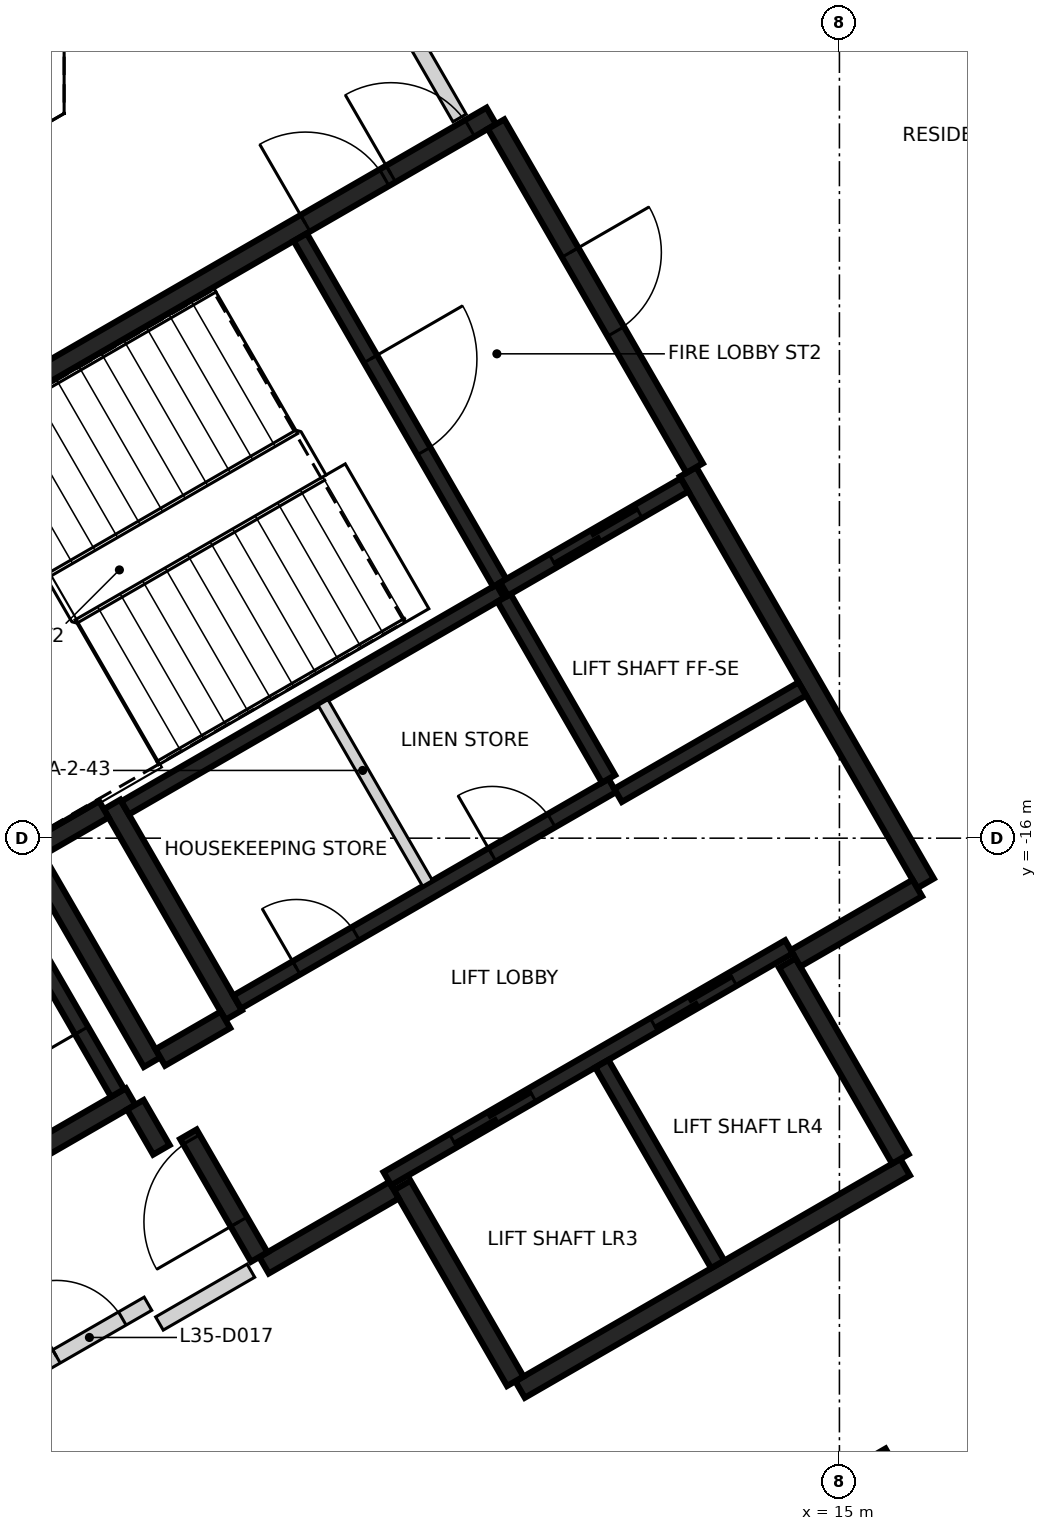
"""IFC4 building model, lengths in metres.
Left out: names, types, materials, properties, quantities, classifications, styles, units other than length and angle.
Written with IfcOpenShell. Run it as: python <this file> out.ifc"""

import sys

from ifc_helpers import new_model, si_unit, direction, frame, frame_2d, origin, origin_2d, place, context, subcontext, project, spatial, rectangle, extrude, element, fill, save


model = new_model("IFC4")
c1 = context("Model", 3, precision=1e-05, world=origin(), true_north=direction((0.0, 1.0)))
c2 = subcontext(c1, "Body", "Model", "MODEL_VIEW")
j1 = project(units=[si_unit("LENGTHUNIT", "METRE"), si_unit("PLANEANGLEUNIT", "RADIAN")], contexts=[c1])
p1 = place(None, origin())
s1 = spatial("IfcSite", under=j1, at=p1, CompositionType="ELEMENT")
p2 = place(p1, origin())
s2 = spatial("IfcBuilding", under=s1, at=p2, CompositionType="ELEMENT")
p3 = place(p2, frame((0.0, 0.0, 143.2)))
s3 = spatial("IfcBuildingStorey", under=s2, at=p3, CompositionType="ELEMENT", Elevation=143.2)
p4 = place(p3, frame((15.207, -26.34, -0.4), z_axis=(0.0, 0.0, 1.0), x_axis=(-0.5, 0.866025403784, 0.0)))
e1 = element("IfcColumn", 1, at=p4, inside=s3, PredefinedType="COLUMN", context=c2, shape_type="SweptSolid", body=[
    extrude(rectangle(XDim=3.6, YDim=3.0, at=origin_2d()), origin(), (0.0, 0.0, 1.0), 3.6),
])
p5 = place(p3, frame((0.417, -12.273, 0.0), z_axis=(0.0, 0.0, 1.0), x_axis=(0.866021906294, 0.500006057782, 0.0)))
e2 = element("IfcWall", 2, at=p5, inside=s3, PredefinedType="SHEAR", context=c2, shape_type="SweptSolid", body=[
    extrude(rectangle(XDim=11.55, YDim=0.25, at=frame_2d((5.775, 0.0))), origin(), (0.0, 0.0, 1.0), 3.2),
])
p6 = place(p5, frame((10.025, 0.0, 0.0)))
e3 = element("IfcOpeningElement", 3, at=p6, cuts=e2, PredefinedType="OPENING", context=c2, shape_type="SweptSolid", body=[
    extrude(rectangle(XDim=1.2, YDim=2.1, at=frame_2d((0.6, 1.05))), frame((0.0, 0.135, 0.0), z_axis=(0.0, -1.0, 0.0), x_axis=(1.0, 0.0, 0.0)), (0.0, 0.0, 1.0), 0.27),
])
p7 = place(p5, frame((8.725, 0.0, 0.0)))
e4 = element("IfcOpeningElement", 4, at=p7, cuts=e2, PredefinedType="OPENING", context=c2, shape_type="SweptSolid", body=[
    extrude(rectangle(XDim=1.2, YDim=2.1, at=frame_2d((0.6, 1.05))), frame((0.0, 0.135, 0.0), z_axis=(0.0, -1.0, 0.0), x_axis=(1.0, 0.0, 0.0)), (0.0, 0.0, 1.0), 0.27),
])
p8 = place(p3, frame((13.008, -11.181, 0.0), z_axis=(0.0, 0.0, 1.0), x_axis=(0.500004234368, -0.866022959057, 0.0)))
e5 = element("IfcWall", 5, at=p8, inside=s3, PredefinedType="SHEAR", context=c2, shape_type="SweptSolid", body=[
    extrude(rectangle(XDim=6.25, YDim=0.25, at=frame_2d((3.125, 0.0))), origin(), (0.0, 0.0, 1.0), 3.2),
])
p9 = place(p3, frame((15.865, -20.328, 0.0), z_axis=(0.0, 0.0, 1.0), x_axis=(-0.86602852612, -0.499994591916, 0.0)))
e6 = element("IfcWall", 6, at=p9, inside=s3, PredefinedType="SHEAR", context=c2, shape_type="SweptSolid", body=[
    extrude(rectangle(XDim=5.85, YDim=0.25, at=frame_2d((2.925, 0.0))), origin(), (0.0, 0.0, 1.0), 3.2),
])
p10 = place(p3, frame((10.483, -6.606, 0.0), z_axis=(0.0, 0.0, 1.0), x_axis=(0.49999885962, -0.866026062182, 0.0)))
e7 = element("IfcWall", 7, at=p10, inside=s3, PredefinedType="SHEAR", context=c2, shape_type="SweptSolid", body=[
    extrude(rectangle(XDim=5.225, YDim=0.25, at=frame_2d((2.612, 0.0))), origin(), (0.0, 0.0, 1.0), 3.2),
])
p11 = place(p10, frame((1.95, 0.0, 0.0)))
e8 = element("IfcOpeningElement", 8, at=p11, cuts=e7, PredefinedType="OPENING", context=c2, shape_type="SweptSolid", body=[
    extrude(rectangle(XDim=1.2, YDim=2.1, at=frame_2d((0.6, 1.05))), frame((0.0, 0.135, 0.0), z_axis=(0.0, -1.0, 0.0), x_axis=(1.0, 0.0, 0.0)), (0.0, 0.0, 1.0), 0.27),
])
p12 = place(p3, frame((7.031, -18.327, 0.0), z_axis=(0.0, 0.0, 1.0), x_axis=(-0.499971222258, 0.866042017984, 0.0)))
e9 = element("IfcWall", 9, at=p12, inside=s3, PredefinedType="SHEAR", context=c2, shape_type="SweptSolid", body=[
    extrude(rectangle(XDim=3.2, YDim=0.25, at=frame_2d((1.6, 0.0))), origin(), (0.0, 0.0, 1.0), 3.2),
])
for number, where, z_axis, x_axis in (
    (10, (14.315, -17.644, 0.0), (0.0, 0.0, 1.0), (0.5, -0.866, 0.0)),
    (11, (10.736, -23.145, 0.0), (0.0, 0.0, 1.0), (-0.5, 0.866, 0.0)),
):
    element("IfcWall", number, at=place(p3, frame(where, z_axis=z_axis, x_axis=x_axis)), inside=s3, PredefinedType="SHEAR", context=c2, shape_type="SweptSolid", body=[
        extrude(rectangle(XDim=2.974, YDim=0.25, at=frame_2d((1.487, 0.0))), origin(), (0.0, 0.0, 1.0), 3.2),
    ])
p13 = place(p3, frame((5.675, -19.399, 0.0), z_axis=(0.0, 0.0, 1.0), x_axis=(-0.866026637627, -0.499997862916, 0.0)))
e12 = element("IfcWall", 12, at=p13, inside=s3, PredefinedType="SHEAR", context=c2, shape_type="SweptSolid", body=[
    extrude(rectangle(XDim=2.865, YDim=0.25, at=frame_2d((1.432, 0.0))), origin(), (0.0, 0.0, 1.0), 3.2),
])
p14 = place(p3, frame((4.414, -16.276, 0.0), z_axis=(0.0, 0.0, 1.0), x_axis=(0.500003324108, -0.866023484601, 0.0)))
e13 = element("IfcWall", 13, at=p14, inside=s3, PredefinedType="SHEAR", context=c2, shape_type="SweptSolid", body=[
    extrude(rectangle(XDim=3.085, YDim=0.25, at=frame_2d((1.542, 0.0))), origin(), (0.0, 0.0, 1.0), 3.2),
])
p15 = place(p3, frame((5.322, -15.619, 0.0), z_axis=(0.0, 0.0, 1.0), x_axis=(-0.866026229868, -0.499998569178, 0.0)))
e14 = element("IfcWall", 14, at=p15, inside=s3, PredefinedType="SHEAR", context=c2, shape_type="SweptSolid", body=[
    extrude(rectangle(XDim=2.449, YDim=0.25, at=frame_2d((1.225, 0.0))), origin(), (0.0, 0.0, 1.0), 3.2),
])
p16 = place(p3, frame((9.14, -20.631, 0.0), z_axis=(0.0, 0.0, 1.0), x_axis=(-0.866043531843, -0.499968599967, 0.0)))
e15 = element("IfcWall", 15, at=p16, inside=s3, PredefinedType="SHEAR", context=c2, shape_type="SweptSolid", body=[
    extrude(rectangle(XDim=1.975, YDim=0.25, at=frame_2d((0.987, 0.0))), origin(), (0.0, 0.0, 1.0), 3.2),
])
p17 = place(p3, frame((16.025, -16.656, 0.0), z_axis=(0.0, 0.0, 1.0), x_axis=(-0.866016279763, -0.500015802937, 0.0)))
e16 = element("IfcWall", 16, at=p17, inside=s3, PredefinedType="SHEAR", context=c2, shape_type="SweptSolid", body=[
    extrude(rectangle(XDim=1.849, YDim=0.25, at=frame_2d((0.925, 0.0))), origin(), (0.0, 0.0, 1.0), 3.2),
])
p18 = place(p3, frame((7.367, -21.51, 0.0), z_axis=(0.0, 0.0, 1.0), x_axis=(-0.499983108224, 0.866035156036, 0.0)))
e17 = element("IfcWall", 17, at=p18, inside=s3, PredefinedType="SHEAR", context=c2, shape_type="SweptSolid", body=[
    extrude(rectangle(XDim=1.865, YDim=0.25, at=frame_2d((0.932, 0.0))), origin(), (0.0, 0.0, 1.0), 3.2),
])
p19 = place(p18, frame((0.535, 0.0, 0.0)))
e18 = element("IfcOpeningElement", 18, at=p19, cuts=e17, PredefinedType="OPENING", context=c2, shape_type="SweptSolid", body=[
    extrude(rectangle(XDim=1.25, YDim=2.1, at=frame_2d((0.625, 1.05))), frame((0.0, 0.135, 0.0), z_axis=(0.0, -1.0, 0.0), x_axis=(1.0, 0.0, 0.0)), (0.0, 0.0, 1.0), 0.27),
])
p20 = place(p3, frame((6.065, -18.885, 0.0), z_axis=(0.0, 0.0, 1.0), x_axis=(0.866017078145, 0.500014420154, 0.0)))
e19 = element("IfcWall", 19, at=p20, inside=s3, PredefinedType="SHEAR", context=c2, shape_type="SweptSolid", body=[
    extrude(rectangle(XDim=0.989, YDim=0.25, at=frame_2d((0.495, 0.0))), origin(), (0.0, 0.0, 1.0), 3.2),
])
p21 = place(p3, frame((6.08, -20.1, 0.0), z_axis=(0.0, 0.0, 1.0), x_axis=(-0.500051773299, 0.865995510393, 0.0)))
e20 = element("IfcWall", 20, at=p21, inside=s3, PredefinedType="SHEAR", context=c2, shape_type="SweptSolid", body=[
    extrude(rectangle(XDim=0.685, YDim=0.25, at=frame_2d((0.342, 0.0))), origin(), (0.0, 0.0, 1.0), 3.2),
])
p22 = place(p3, frame((9.052, -20.48, 0.0), z_axis=(0.0, 0.0, 1.0), x_axis=(0.866030299012, 0.499991521122, 0.0)))
e21 = element("IfcWall", 21, at=p22, inside=s3, PredefinedType="SHEAR", context=c2, shape_type="SweptSolid", body=[
    extrude(rectangle(XDim=6.1, YDim=0.2, at=frame_2d((3.05, 0.0))), origin(), (0.0, 0.0, 1.0), 3.2),
])
p23 = place(p22, frame((1.0, 0.0, 0.0)))
e22 = element("IfcOpeningElement", 22, at=p23, cuts=e21, PredefinedType="OPENING", context=c2, shape_type="SweptSolid", body=[
    extrude(rectangle(XDim=1.2, YDim=2.1, at=frame_2d((0.6, 1.05))), frame((0.0, 0.11, 0.0), z_axis=(0.0, -1.0, 0.0), x_axis=(1.0, 0.0, 0.0)), (0.0, 0.0, 1.0), 0.22),
])
p24 = place(p22, frame((4.05, 0.0, 0.0)))
e23 = element("IfcOpeningElement", 23, at=p24, cuts=e21, PredefinedType="OPENING", context=c2, shape_type="SweptSolid", body=[
    extrude(rectangle(XDim=1.2, YDim=2.1, at=frame_2d((0.6, 1.05))), frame((0.0, 0.11, 0.0), z_axis=(0.0, -1.0, 0.0), x_axis=(1.0, 0.0, 0.0)), (0.0, 0.0, 1.0), 0.22),
])
p25 = place(p3, frame((10.538, -12.752, 0.0), z_axis=(0.0, 0.0, 1.0), x_axis=(-0.866038630372, -0.499977090179, 0.0)))
e24 = element("IfcWall", 24, at=p25, inside=s3, PredefinedType="SHEAR", context=c2, shape_type="SweptSolid", body=[
    extrude(rectangle(XDim=5.699, YDim=0.2, at=frame_2d((2.85, 0.0))), origin(), (0.0, 0.0, 1.0), 3.2),
])
p26 = place(p3, frame((7.077, -18.156, 0.0), z_axis=(0.0, 0.0, 1.0), x_axis=(0.866038630372, 0.499977090179, 0.0)))
e25 = element("IfcWall", 25, at=p26, inside=s3, PredefinedType="SHEAR", context=c2, shape_type="SweptSolid", body=[
    extrude(rectangle(XDim=5.699, YDim=0.2, at=frame_2d((2.85, 0.0))), origin(), (0.0, 0.0, 1.0), 3.2),
])
p27 = place(p26, frame((0.899, 0.0, 0.0)))
e26 = element("IfcOpeningElement", 26, at=p27, cuts=e25, PredefinedType="OPENING", context=c2, shape_type="SweptSolid", body=[
    extrude(rectangle(XDim=0.9, YDim=2.1, at=frame_2d((0.45, 1.05))), frame((0.0, 0.11, 0.0), z_axis=(0.0, -1.0, 0.0), x_axis=(1.0, 0.0, 0.0)), (0.0, 0.0, 1.0), 0.22),
])
p28 = place(p26, frame((3.874, 0.0, 0.0)))
e27 = element("IfcOpeningElement", 27, at=p28, cuts=e25, PredefinedType="OPENING", context=c2, shape_type="SweptSolid", body=[
    extrude(rectangle(XDim=0.9, YDim=2.1, at=frame_2d((0.45, 1.05))), frame((0.0, 0.11, 0.0), z_axis=(0.0, -1.0, 0.0), x_axis=(1.0, 0.0, 0.0)), (0.0, 0.0, 1.0), 0.22),
])
p29 = place(p3, frame((7.906, -8.094, 0.0), z_axis=(0.0, 0.0, 1.0), x_axis=(0.500024287448, -0.866011380966, 0.0)))
e28 = element("IfcWall", 28, at=p29, inside=s3, PredefinedType="SHEAR", context=c2, shape_type="SweptSolid", body=[
    extrude(rectangle(XDim=5.251, YDim=0.2, at=frame_2d((2.625, 0.0))), origin(), (0.0, 0.0, 1.0), 3.2),
])
p30 = place(p29, frame((1.849, 0.0, 0.0)))
e29 = element("IfcOpeningElement", 29, at=p30, cuts=e28, PredefinedType="OPENING", context=c2, shape_type="SweptSolid", body=[
    extrude(rectangle(XDim=1.4, YDim=2.1, at=frame_2d((0.7, 1.05))), frame((0.0, 0.11, 0.0), z_axis=(0.0, -1.0, 0.0), x_axis=(1.0, 0.0, 0.0)), (0.0, 0.0, 1.0), 0.22),
])
p31 = place(p3, frame((11.875, -18.967, 0.0), z_axis=(0.0, 0.0, 1.0), x_axis=(0.49998131003, -0.866036194175, 0.0)))
e30 = element("IfcWall", 30, at=p31, inside=s3, PredefinedType="SHEAR", context=c2, shape_type="SweptSolid", body=[
    extrude(rectangle(XDim=3.048, YDim=0.2, at=frame_2d((1.524, 0.0))), origin(), (0.0, 0.0, 1.0), 3.2),
])
p32 = place(p3, frame((5.503, -19.352, 0.0), z_axis=(0.0, 0.0, 1.0), x_axis=(-0.499986818241, 0.866033014143, 0.0)))
e31 = element("IfcWall", 31, at=p32, inside=s3, PredefinedType="SHEAR", context=c2, shape_type="SweptSolid", body=[
    extrude(rectangle(XDim=2.798, YDim=0.2, at=frame_2d((1.399, 0.0))), origin(), (0.0, 0.0, 1.0), 3.2),
])
p33 = place(p32, frame((0.949, 0.0, 0.0)))
e32 = element("IfcOpeningElement", 32, at=p33, cuts=e31, PredefinedType="OPENING", context=c2, shape_type="SweptSolid", body=[
    extrude(rectangle(XDim=0.9, YDim=2.1, at=frame_2d((0.45, 1.05))), frame((0.0, 0.11, 0.0), z_axis=(0.0, -1.0, 0.0), x_axis=(1.0, 0.0, 0.0)), (0.0, 0.0, 1.0), 0.22),
])
p34 = place(p3, frame((11.963, -15.22, 0.0), z_axis=(0.0, 0.0, 1.0), x_axis=(-0.500034990121, 0.866005201286, 0.0)))
e33 = element("IfcWall", 33, at=p34, inside=s3, PredefinedType="SHEAR", context=c2, shape_type="SweptSolid", body=[
    extrude(rectangle(XDim=2.75, YDim=0.2, at=frame_2d((1.375, 0.0))), origin(), (0.0, 0.0, 1.0), 3.2),
])
p35 = place(p3, frame((10.587, -12.723, 0.0), z_axis=(0.0, 0.0, 1.0), x_axis=(0.866037306777, 0.499979382845, 0.0)))
e34 = element("IfcWall", 34, at=p35, inside=s3, PredefinedType="SHEAR", context=c2, shape_type="SweptSolid", body=[
    extrude(rectangle(XDim=2.742, YDim=0.2, at=frame_2d((1.371, 0.0))), origin(), (0.0, 0.0, 1.0), 3.2),
])
p36 = place(p35, frame((0.743, 0.0, 0.0)))
e35 = element("IfcOpeningElement", 35, at=p36, cuts=e34, PredefinedType="OPENING", context=c2, shape_type="SweptSolid", body=[
    extrude(rectangle(XDim=1.3, YDim=2.1, at=frame_2d((0.65, 1.05))), frame((0.0, 0.11, 0.0), z_axis=(0.0, -1.0, 0.0), x_axis=(1.0, 0.0, 0.0)), (0.0, 0.0, 1.0), 0.22),
])
p37 = place(p3, frame((14.512, -14.037, 0.0), z_axis=(0.0, 0.0, 1.0), x_axis=(-0.866044696403, -0.499966582715, 0.0)))
e36 = element("IfcWall", 36, at=p37, inside=s3, PredefinedType="SHEAR", context=c2, shape_type="SweptSolid", body=[
    extrude(rectangle(XDim=2.799, YDim=0.2, at=frame_2d((1.399, 0.0))), origin(), (0.0, 0.0, 1.0), 3.2),
])
p38 = place(p3, frame((8.207, -14.214, 0.0), z_axis=(0.0, 0.0, 1.0), x_axis=(0.50002746344, -0.86600954718, 0.0)))
e37 = element("IfcWall", 37, at=p38, inside=s3, PredefinedType="PARTITIONING", context=c2, shape_type="SweptSolid", body=[
    extrude(rectangle(XDim=2.748, YDim=0.15, at=frame_2d((1.374, 0.0))), origin(), (0.0, 0.0, 1.0), 3.2),
])
p39 = place(p3, frame((4.362, -23.012, 0.0), z_axis=(0.0, 0.0, 1.0), x_axis=(0.866692617793, 0.49884256661, 0.0)))
e38 = element("IfcWall", 38, at=p39, inside=s3, PredefinedType="PARTITIONING", context=c2, shape_type="SweptSolid", body=[
    extrude(rectangle(XDim=1.778, YDim=0.2, at=frame_2d((0.889, 0.0))), origin(), (0.0, 0.0, 1.0), 3.2),
])
p40 = place(p39, frame((0.389, 0.0, 0.0)))
e39 = element("IfcOpeningElement", 39, at=p40, cuts=e38, PredefinedType="OPENING", context=c2, shape_type="SweptSolid", body=[
    extrude(rectangle(XDim=1.0, YDim=2.1, at=frame_2d((0.5, 1.05))), frame((0.0, 0.11, 0.0), z_axis=(0.0, -1.0, 0.0), x_axis=(1.0, 0.0, 0.0)), (0.0, 0.0, 1.0), 0.22),
])
p41 = place(p3, frame((6.054, -22.385, 0.0), z_axis=(0.0, 0.0, 1.0), x_axis=(0.86593101922, 0.500163443238, 0.0)))
e40 = element("IfcWall", 40, at=p41, inside=s3, PredefinedType="PARTITIONING", context=c2, shape_type="SweptSolid", body=[
    extrude(rectangle(XDim=1.39, YDim=0.2, at=frame_2d((0.695, 0.0))), origin(), (0.0, 0.0, 1.0), 3.2),
])
p42 = place(p3, frame((9.4, -5.482, 0.0), z_axis=(0.0, 0.0, 1.0), x_axis=(0.499909562097, -0.866077611837, 0.0)))
e41 = element("IfcWall", 41, at=p42, inside=s3, PredefinedType="PARTITIONING", context=c2, shape_type="SweptSolid", body=[
    extrude(rectangle(XDim=1.205, YDim=0.2, at=frame_2d((0.603, 0.0))), origin(), (0.0, 0.0, 1.0), 3.2),
])
p43 = place(p36, origin())
e42 = element("IfcDoor", 42, at=p43, inside=s3, OperationType="SLIDING_TO_RIGHT", PredefinedType="DOOR", context=c2, shape_type="SweptSolid", body=[
    extrude(rectangle(XDim=1.3, YDim=2.1, at=frame_2d((0.65, 1.05))), frame((0.0, 0.025, 0.0), z_axis=(0.0, -1.0, 0.0), x_axis=(1.0, 0.0, 0.0)), (0.0, 0.0, 1.0), 0.05),
])
fill(e35, e42)
p44 = place(p23, origin())
e43 = element("IfcDoor", 43, at=p44, inside=s3, OperationType="DOUBLE_DOOR_SLIDING", PredefinedType="DOOR", context=c2, shape_type="SweptSolid", body=[
    extrude(rectangle(XDim=1.2, YDim=2.1, at=frame_2d((0.6, 1.05))), frame((0.0, 0.025, 0.0), z_axis=(0.0, -1.0, 0.0), x_axis=(1.0, 0.0, 0.0)), (0.0, 0.0, 1.0), 0.05),
])
fill(e22, e43)
p45 = place(p24, origin())
e44 = element("IfcDoor", 44, at=p45, inside=s3, OperationType="DOUBLE_DOOR_SLIDING", PredefinedType="DOOR", context=c2, shape_type="SweptSolid", body=[
    extrude(rectangle(XDim=1.2, YDim=2.1, at=frame_2d((0.6, 1.05))), frame((0.0, 0.025, 0.0), z_axis=(0.0, -1.0, 0.0), x_axis=(1.0, 0.0, 0.0)), (0.0, 0.0, 1.0), 0.05),
])
fill(e23, e44)
p46 = place(p19, origin())
e45 = element("IfcDoor", 45, at=p46, inside=s3, OperationType="SINGLE_SWING_LEFT", PredefinedType="DOOR", context=c2, shape_type="SweptSolid", body=[
    extrude(rectangle(XDim=1.25, YDim=2.1, at=frame_2d((0.625, 1.05))), frame((0.0, 0.025, 0.0), z_axis=(0.0, -1.0, 0.0), x_axis=(1.0, 0.0, 0.0)), (0.0, 0.0, 1.0), 0.05),
])
fill(e18, e45)
p47 = place(p6, origin())
e46 = element("IfcDoor", 46, at=p47, inside=s3, OperationType="SINGLE_SWING_LEFT", PredefinedType="DOOR", context=c2, shape_type="SweptSolid", body=[
    extrude(rectangle(XDim=1.2, YDim=2.1, at=frame_2d((0.6, 1.05))), frame((0.0, 0.025, 0.0), z_axis=(0.0, -1.0, 0.0), x_axis=(1.0, 0.0, 0.0)), (0.0, 0.0, 1.0), 0.05),
])
fill(e3, e46)
p48 = place(p7, origin())
e47 = element("IfcDoor", 47, at=p48, inside=s3, OperationType="SINGLE_SWING_RIGHT", PredefinedType="DOOR", context=c2, shape_type="SweptSolid", body=[
    extrude(rectangle(XDim=1.2, YDim=2.1, at=frame_2d((0.6, 1.05))), frame((0.0, 0.025, 0.0), z_axis=(0.0, -1.0, 0.0), x_axis=(1.0, 0.0, 0.0)), (0.0, 0.0, 1.0), 0.05),
])
fill(e4, e47)
p49 = place(p30, origin())
e48 = element("IfcDoor", 48, at=p49, inside=s3, OperationType="SINGLE_SWING_RIGHT", PredefinedType="DOOR", context=c2, shape_type="SweptSolid", body=[
    extrude(rectangle(XDim=1.4, YDim=2.1, at=frame_2d((0.7, 1.05))), frame((0.0, 0.025, 0.0), z_axis=(0.0, -1.0, 0.0), x_axis=(1.0, 0.0, 0.0)), (0.0, 0.0, 1.0), 0.05),
])
fill(e29, e48)
p50 = place(p27, origin())
e49 = element("IfcDoor", 49, at=p50, inside=s3, OperationType="SINGLE_SWING_LEFT", PredefinedType="DOOR", context=c2, shape_type="SweptSolid", body=[
    extrude(rectangle(XDim=0.9, YDim=2.1, at=frame_2d((0.45, 1.05))), frame((0.0, 0.025, 0.0), z_axis=(0.0, -1.0, 0.0), x_axis=(1.0, 0.0, 0.0)), (0.0, 0.0, 1.0), 0.05),
])
fill(e26, e49)
p51 = place(p28, origin())
e50 = element("IfcDoor", 50, at=p51, inside=s3, OperationType="SINGLE_SWING_RIGHT", PredefinedType="DOOR", context=c2, shape_type="SweptSolid", body=[
    extrude(rectangle(XDim=0.9, YDim=2.1, at=frame_2d((0.45, 1.05))), frame((0.0, 0.025, 0.0), z_axis=(0.0, -1.0, 0.0), x_axis=(1.0, 0.0, 0.0)), (0.0, 0.0, 1.0), 0.05),
])
fill(e27, e50)
p52 = place(p33, origin())
e51 = element("IfcDoor", 51, at=p52, inside=s3, OperationType="SINGLE_SWING_LEFT", PredefinedType="DOOR", context=c2, shape_type="SweptSolid", body=[
    extrude(rectangle(XDim=0.9, YDim=2.1, at=frame_2d((0.45, 1.05))), frame((0.0, 0.025, 0.0), z_axis=(0.0, -1.0, 0.0), x_axis=(1.0, 0.0, 0.0)), (0.0, 0.0, 1.0), 0.05),
])
fill(e32, e51)
p53 = place(p11, origin())
e52 = element("IfcDoor", 52, at=p53, inside=s3, OperationType="SINGLE_SWING_LEFT", PredefinedType="DOOR", context=c2, shape_type="SweptSolid", body=[
    extrude(rectangle(XDim=1.2, YDim=2.1, at=frame_2d((0.6, 1.05))), frame((0.0, 0.025, 0.0), z_axis=(0.0, -1.0, 0.0), x_axis=(1.0, 0.0, 0.0)), (0.0, 0.0, 1.0), 0.05),
])
fill(e8, e52)
p54 = place(p40, frame((1.0, 0.0, 0.0), z_axis=(0.0, 0.0, 1.0), x_axis=(-1.0, 0.0, 0.0)))
e53 = element("IfcDoor", 53, at=p54, inside=s3, OperationType="SINGLE_SWING_LEFT", PredefinedType="DOOR", context=c2, shape_type="SweptSolid", body=[
    extrude(rectangle(XDim=1.0, YDim=2.1, at=frame_2d((0.5, 1.05))), frame((0.0, 0.025, 0.0), z_axis=(0.0, -1.0, 0.0), x_axis=(1.0, 0.0, 0.0)), (0.0, 0.0, 1.0), 0.05),
])
fill(e39, e53)
save(model, sys.argv[1])
